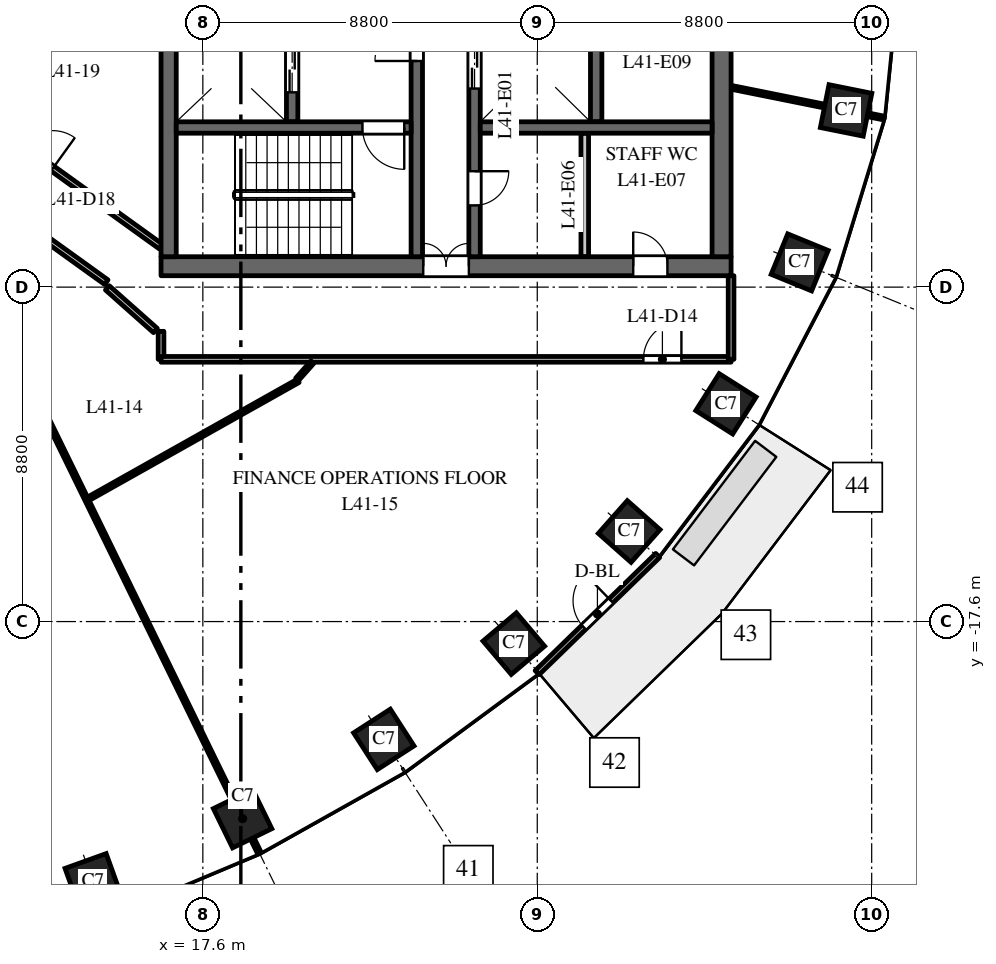
"""IFC4 building model, lengths in metres.
Left out: names, types, materials, properties, quantities, classifications, styles, units other than length and angle.
Written with IfcOpenShell. Run it as: python <this file> out.ifc"""

import sys

from ifc_helpers import new_model, si_unit, direction, frame, frame_2d, origin, origin_2d, place, context, subcontext, project, spatial, rectangle, extrude, element, fill, save


model = new_model("IFC4")
c1 = context("Model", 3, precision=1e-05, world=origin(), true_north=direction((0.0, 1.0)))
c2 = subcontext(c1, "Body", "Model", "MODEL_VIEW")
j1 = project(units=[si_unit("LENGTHUNIT", "METRE"), si_unit("PLANEANGLEUNIT", "RADIAN")], contexts=[c1])
p1 = place(None, origin())
s1 = spatial("IfcSite", under=j1, at=p1, CompositionType="ELEMENT")
p2 = place(p1, origin())
s2 = spatial("IfcBuilding", under=s1, at=p2, CompositionType="ELEMENT")
p3 = place(p2, frame((0.0, 0.0, 178.0)))
s3 = spatial("IfcBuildingStorey", under=s2, at=p3, CompositionType="ELEMENT", Elevation=178.0)
for number, where, z_axis, x_axis in (
    (1, (14.709, -24.441, 0.0), (0.0, 0.0, 1.0), (0.941, 0.338, 0.0)),
    (2, (18.646, -22.785, 0.0), (0.0, 0.0, 1.0), (0.898, 0.439, 0.0)),
    (3, (22.362, -20.7, 0.0), (0.0, 0.0, 1.0), (0.84, 0.542, 0.0)),
    (4, (25.783, -18.18, 0.0), (0.0, 0.0, 1.0), (0.763, 0.646, 0.0)),
    (5, (28.819, -15.23, 0.0), (0.0, 0.0, 1.0), (0.663, 0.749, 0.0)),
    (6, (31.365, -11.871, 0.0), (0.0, 0.0, 1.0), (0.535, 0.845, 0.0)),
    (7, (33.305, -8.149, 0.0), (0.0, 0.0, 1.0), (0.379, 0.925, 0.0)),
    (8, (34.527, -4.151, 0.0), (0.0, 0.0, 1.0), (0.197, 0.98, 0.0)),
):
    element("IfcColumn", number, at=place(p3, frame(where, z_axis=z_axis, x_axis=x_axis)), inside=s3, PredefinedType="COLUMN", context=c2, shape_type="SweptSolid", body=[
        extrude(rectangle(XDim=1.15, YDim=1.15, at=origin_2d()), origin(), (0.0, 0.0, 1.0), 4.0),
    ])
p4 = place(p3, frame((16.5, -8.25, 0.0), z_axis=(0.0, 0.0, 1.0), x_axis=(1.0, 0.0, 0.0)))
e9 = element("IfcWall", 9, at=p4, inside=s3, PredefinedType="SHEAR", context=c2, shape_type="SweptSolid", body=[
    extrude(rectangle(XDim=15.0, YDim=0.5, at=frame_2d((7.5, 0.0))), origin(), (0.0, 0.0, 1.0), 3.7),
])
p5 = place(p4, frame((6.9, 0.0, 0.0)))
e10 = element("IfcOpeningElement", 10, at=p5, cuts=e9, PredefinedType="OPENING", context=c2, shape_type="SweptSolid", body=[
    extrude(rectangle(XDim=1.2, YDim=2.1, at=frame_2d((0.6, 1.05))), frame((0.0, 0.26, 0.0), z_axis=(0.0, -1.0, 0.0), x_axis=(1.0, 0.0, 0.0)), (0.0, 0.0, 1.0), 0.52),
])
p6 = place(p4, frame((12.425, 0.0, 0.0)))
e11 = element("IfcOpeningElement", 11, at=p6, cuts=e9, PredefinedType="OPENING", context=c2, shape_type="SweptSolid", body=[
    extrude(rectangle(XDim=0.9, YDim=2.1, at=frame_2d((0.45, 1.05))), frame((0.0, 0.26, 0.0), z_axis=(0.0, -1.0, 0.0), x_axis=(1.0, 0.0, 0.0)), (0.0, 0.0, 1.0), 0.52),
])
p7 = place(p3, frame((27.95, -4.45, 0.0), z_axis=(0.0, 0.0, 1.0), x_axis=(0.0, 1.0, 0.0)))
e12 = element("IfcWall", 12, at=p7, inside=s3, PredefinedType="SHEAR", context=c2, shape_type="SweptSolid", body=[
    extrude(rectangle(XDim=8.9, YDim=0.3, at=frame_2d((4.45, 0.0))), origin(), (0.0, 0.0, 1.0), 3.7),
])
p8 = place(p3, frame((19.95, -4.45, 0.0), z_axis=(0.0, 0.0, 1.0), x_axis=(0.0, 1.0, 0.0)))
e13 = element("IfcWall", 13, at=p8, inside=s3, PredefinedType="SHEAR", context=c2, shape_type="SweptSolid", body=[
    extrude(rectangle(XDim=8.9, YDim=0.3, at=frame_2d((4.45, 0.0))), origin(), (0.0, 0.0, 1.0), 3.7),
])
p9 = place(p8, frame((0.775, 0.0, 0.0)))
e14 = element("IfcOpeningElement", 14, at=p9, cuts=e13, PredefinedType="OPENING", context=c2, shape_type="SweptSolid", body=[
    extrude(rectangle(XDim=1.2, YDim=2.1, at=frame_2d((0.6, 1.05))), frame((0.0, 0.16, 0.0), z_axis=(0.0, -1.0, 0.0), x_axis=(1.0, 0.0, 0.0)), (0.0, 0.0, 1.0), 0.32),
])
p10 = place(p8, frame((4.675, 0.0, 0.0)))
e15 = element("IfcOpeningElement", 15, at=p10, cuts=e13, PredefinedType="OPENING", context=c2, shape_type="SweptSolid", body=[
    extrude(rectangle(XDim=1.1, YDim=2.1, at=frame_2d((0.55, 1.05))), frame((0.0, 0.16, 0.0), z_axis=(0.0, -1.0, 0.0), x_axis=(1.0, 0.0, 0.0)), (0.0, 0.0, 1.0), 0.32),
])
p11 = place(p8, frame((7.25, 0.0, 0.0)))
e16 = element("IfcOpeningElement", 16, at=p11, cuts=e13, PredefinedType="OPENING", context=c2, shape_type="SweptSolid", body=[
    extrude(rectangle(XDim=1.1, YDim=2.1, at=frame_2d((0.55, 1.05))), frame((0.0, 0.16, 0.0), z_axis=(0.0, -1.0, 0.0), x_axis=(1.0, 0.0, 0.0)), (0.0, 0.0, 1.0), 0.32),
])
p12 = place(p3, frame((24.75, -8.0, 0.0), z_axis=(0.0, 0.0, 1.0), x_axis=(0.0, 1.0, 0.0)))
e17 = element("IfcWall", 17, at=p12, inside=s3, PredefinedType="SHEAR", context=c2, shape_type="SweptSolid", body=[
    extrude(rectangle(XDim=16.0, YDim=0.3, at=frame_2d((8.0, 0.0))), origin(), (0.0, 0.0, 1.0), 3.7),
])
p13 = place(p12, frame((4.425, 0.0, 0.0)))
e18 = element("IfcOpeningElement", 18, at=p13, cuts=e17, PredefinedType="OPENING", context=c2, shape_type="SweptSolid", body=[
    extrude(rectangle(XDim=1.1, YDim=2.1, at=frame_2d((0.55, 1.05))), frame((0.0, 0.16, 0.0), z_axis=(0.0, -1.0, 0.0), x_axis=(1.0, 0.0, 0.0)), (0.0, 0.0, 1.0), 0.32),
])
p14 = place(p12, frame((7.45, 0.0, 0.0)))
e19 = element("IfcOpeningElement", 19, at=p14, cuts=e17, PredefinedType="OPENING", context=c2, shape_type="SweptSolid", body=[
    extrude(rectangle(XDim=1.1, YDim=2.1, at=frame_2d((0.55, 1.05))), frame((0.0, 0.16, 0.0), z_axis=(0.0, -1.0, 0.0), x_axis=(1.0, 0.0, 0.0)), (0.0, 0.0, 1.0), 0.32),
])
p15 = place(p12, frame((10.475, 0.0, 0.0)))
e20 = element("IfcOpeningElement", 20, at=p15, cuts=e17, PredefinedType="OPENING", context=c2, shape_type="SweptSolid", body=[
    extrude(rectangle(XDim=1.1, YDim=2.1, at=frame_2d((0.55, 1.05))), frame((0.0, 0.16, 0.0), z_axis=(0.0, -1.0, 0.0), x_axis=(1.0, 0.0, 0.0)), (0.0, 0.0, 1.0), 0.32),
])
p16 = place(p12, frame((13.75, 0.0, 0.0)))
e21 = element("IfcOpeningElement", 21, at=p16, cuts=e17, PredefinedType="OPENING", context=c2, shape_type="SweptSolid", body=[
    extrude(rectangle(XDim=0.9, YDim=2.1, at=frame_2d((0.45, 1.05))), frame((0.0, 0.16, 0.0), z_axis=(0.0, -1.0, 0.0), x_axis=(1.0, 0.0, 0.0)), (0.0, 0.0, 1.0), 0.32),
])
p17 = place(p12, frame((1.35, 0.0, 0.0)))
e22 = element("IfcOpeningElement", 22, at=p17, cuts=e17, PredefinedType="OPENING", context=c2, shape_type="SweptSolid", body=[
    extrude(rectangle(XDim=0.9, YDim=2.1, at=frame_2d((0.45, 1.05))), frame((0.0, 0.16, 0.0), z_axis=(0.0, -1.0, 0.0), x_axis=(1.0, 0.0, 0.0)), (0.0, 0.0, 1.0), 0.32),
])
p18 = place(p3, frame((16.7, -8.0, 0.0), z_axis=(0.0, 0.0, 1.0), x_axis=(0.0, 1.0, 0.0)))
e23 = element("IfcWall", 23, at=p18, inside=s3, PredefinedType="SHEAR", context=c2, shape_type="SweptSolid", body=[
    extrude(rectangle(XDim=16.0, YDim=0.4, at=frame_2d((8.0, 0.0))), origin(), (0.0, 0.0, 1.0), 3.7),
])
p19 = place(p3, frame((31.25, -8.0, 0.0), z_axis=(0.0, 0.0, 1.0), x_axis=(0.0, 1.0, 0.0)))
e24 = element("IfcWall", 24, at=p19, inside=s3, PredefinedType="SHEAR", context=c2, shape_type="SweptSolid", body=[
    extrude(rectangle(XDim=16.0, YDim=0.5, at=frame_2d((8.0, 0.0))), origin(), (0.0, 0.0, 1.0), 3.7),
])
p20 = place(p3, frame((27.65, -8.0, 0.0), z_axis=(0.0, 0.0, 1.0), x_axis=(0.0, 1.0, 0.0)))
e25 = element("IfcWall", 25, at=p20, inside=s3, PredefinedType="PARTITIONING", context=c2, shape_type="SweptSolid", body=[
    extrude(rectangle(XDim=3.25, YDim=0.2, at=frame_2d((1.625, 0.0))), origin(), (0.0, 0.0, 1.0), 3.7),
])
p21 = place(p3, frame((24.9, -4.6, 0.0), z_axis=(0.0, 0.0, 1.0), x_axis=(1.0, 0.0, 0.0)))
e26 = element("IfcWall", 26, at=p21, inside=s3, PredefinedType="SHEAR", context=c2, shape_type="SweptSolid", body=[
    extrude(rectangle(XDim=6.1, YDim=0.3, at=frame_2d((3.05, 0.0))), origin(), (0.0, 0.0, 1.0), 3.7),
])
p22 = place(p3, frame((23.23, -8.0, 0.0), z_axis=(0.0, 0.0, 1.0), x_axis=(0.0, 1.0, 0.0)))
e27 = element("IfcWall", 27, at=p22, inside=s3, PredefinedType="SHEAR", context=c2, shape_type="SweptSolid", body=[
    extrude(rectangle(XDim=7.875, YDim=0.3, at=frame_2d((3.938, 0.0))), origin(), (0.0, 0.0, 1.0), 3.7),
])
p23 = place(p22, frame((5.15, 0.0, 0.0)))
e28 = element("IfcOpeningElement", 28, at=p23, cuts=e27, PredefinedType="OPENING", context=c2, shape_type="SweptSolid", body=[
    extrude(rectangle(XDim=1.1, YDim=2.1, at=frame_2d((0.55, 1.05))), frame((0.0, 0.16, 0.0), z_axis=(0.0, -1.0, 0.0), x_axis=(1.0, 0.0, 0.0)), (0.0, 0.0, 1.0), 0.32),
])
p24 = place(p3, frame((16.9, -4.6, 0.0), z_axis=(0.0, 0.0, 1.0), x_axis=(1.0, 0.0, 0.0)))
e29 = element("IfcWall", 29, at=p24, inside=s3, PredefinedType="SHEAR", context=c2, shape_type="SweptSolid", body=[
    extrude(rectangle(XDim=6.18, YDim=0.3, at=frame_2d((3.09, 0.0))), origin(), (0.0, 0.0, 1.0), 3.7),
])
p25 = place(p24, frame((4.9, 0.0, 0.0)))
e30 = element("IfcOpeningElement", 30, at=p25, cuts=e29, PredefinedType="OPENING", context=c2, shape_type="SweptSolid", body=[
    extrude(rectangle(XDim=1.1, YDim=2.1, at=frame_2d((0.55, 1.05))), frame((0.0, 0.16, 0.0), z_axis=(0.0, -1.0, 0.0), x_axis=(1.0, 0.0, 0.0)), (0.0, 0.0, 1.0), 0.32),
])
p26 = place(p3, frame((26.396, -18.943, 0.0), z_axis=(0.0, 0.0, 1.0), x_axis=(0.717214761864, 0.696852197647, 0.0)))
e31 = element("IfcWall", 31, at=p26, inside=s3, PredefinedType="STANDARD", context=c2, shape_type="SweptSolid", body=[
    extrude(rectangle(XDim=4.424, YDim=0.15, at=frame_2d((2.212, 0.0))), origin(), (0.0, 0.0, 1.0), 3.7),
])
p27 = place(p26, frame((1.712, 0.0, 0.0)))
e32 = element("IfcOpeningElement", 32, at=p27, cuts=e31, PredefinedType="OPENING", context=c2, shape_type="SweptSolid", body=[
    extrude(rectangle(XDim=1.0, YDim=2.4, at=frame_2d((0.5, 1.2))), frame((0.0, 0.085, 0.0), z_axis=(0.0, -1.0, 0.0), x_axis=(1.0, 0.0, 0.0)), (0.0, 0.0, 1.0), 0.17),
])
p28 = place(p3, frame((10.439, -5.345, 0.0), z_axis=(0.0, 0.0, 1.0), x_axis=(0.811697765448, -0.584077681106, 0.0)))
e33 = element("IfcWall", 33, at=p28, inside=s3, PredefinedType="PARTITIONING", context=c2, shape_type="SweptSolid", body=[
    extrude(rectangle(XDim=5.694, YDim=0.15, at=frame_2d((2.847, 0.0))), origin(), (0.0, 0.0, 1.0), 2.75),
])
p29 = place(p28, frame((0.65, 0.0, 0.0)))
e34 = element("IfcOpeningElement", 34, at=p29, cuts=e33, PredefinedType="OPENING", context=c2, shape_type="SweptSolid", body=[
    extrude(rectangle(XDim=1.0, YDim=2.1, at=frame_2d((0.5, 1.05))), frame((0.0, 0.085, 0.0), z_axis=(0.0, -1.0, 0.0), x_axis=(1.0, 0.0, 0.0)), (0.0, 0.0, 1.0), 0.17),
])
p30 = place(p3, frame((11.291, -3.986, 0.0), z_axis=(0.0, 0.0, 1.0), x_axis=(0.81164111506, -0.584156400584, 0.0)))
e35 = element("IfcWall", 35, at=p30, inside=s3, PredefinedType="PARTITIONING", context=c2, shape_type="SweptSolid", body=[
    extrude(rectangle(XDim=6.418, YDim=0.15, at=frame_2d((3.209, 0.0))), origin(), (0.0, 0.0, 1.0), 3.7),
])
p31 = place(p30, frame((1.903, 0.0, 0.0)))
e36 = element("IfcOpeningElement", 36, at=p31, cuts=e35, PredefinedType="OPENING", context=c2, shape_type="SweptSolid", body=[
    extrude(rectangle(XDim=1.0, YDim=2.1, at=frame_2d((0.5, 1.05))), frame((0.0, 0.085, 0.0), z_axis=(0.0, -1.0, 0.0), x_axis=(1.0, 0.0, 0.0)), (0.0, 0.0, 1.0), 0.17),
])
p32 = place(p3, frame((12.769, -10.765, 0.0), z_axis=(0.0, 0.0, 1.0), x_axis=(0.439149239372, -0.898414128094, 0.0)))
e37 = element("IfcWall", 37, at=p32, inside=s3, PredefinedType="PARTITIONING", context=c2, shape_type="SweptSolid", body=[
    extrude(rectangle(XDim=14.382, YDim=0.1, at=frame_2d((7.191, 0.0))), origin(), (0.0, 0.0, 1.0), 2.9),
])
p33 = place(p3, frame((14.588, -14.369, 0.0), z_axis=(0.0, 0.0, 1.0), x_axis=(0.871762845587, 0.489928097841, 0.0)))
e38 = element("IfcWall", 38, at=p33, inside=s3, PredefinedType="PARTITIONING", context=c2, shape_type="SweptSolid", body=[
    extrude(rectangle(XDim=6.333, YDim=0.1, at=frame_2d((3.167, 0.0))), origin(), (0.0, 0.0, 1.0), 3.7),
])
p34 = place(p3, frame((16.5, -10.7, 0.0), z_axis=(0.0, 0.0, 1.0), x_axis=(0.0, 1.0, 0.0)))
e39 = element("IfcWall", 39, at=p34, inside=s3, PredefinedType="PARTITIONING", context=c2, shape_type="SweptSolid", body=[
    extrude(rectangle(XDim=0.736, YDim=0.15, at=frame_2d((0.368, 0.0))), origin(), (0.0, 0.0, 1.0), 3.7),
])
p35 = place(p3, frame((16.5, -10.7, 0.0), z_axis=(0.0, 0.0, 1.0), x_axis=(1.0, 0.0, 0.0)))
e40 = element("IfcWall", 40, at=p35, inside=s3, PredefinedType="PARTITIONING", context=c2, shape_type="SweptSolid", body=[
    extrude(rectangle(XDim=15.0, YDim=0.15, at=frame_2d((7.5, 0.0))), origin(), (0.0, 0.0, 1.0), 2.75),
])
p36 = place(p35, frame((12.693, 0.0, 0.0)))
e41 = element("IfcOpeningElement", 41, at=p36, cuts=e40, PredefinedType="OPENING", context=c2, shape_type="SweptSolid", body=[
    extrude(rectangle(XDim=1.0, YDim=2.1, at=frame_2d((0.5, 1.05))), frame((0.0, 0.085, 0.0), z_axis=(0.0, -1.0, 0.0), x_axis=(1.0, 0.0, 0.0)), (0.0, 0.0, 1.0), 0.17),
])
p37 = place(p3, frame((20.079, -11.229, 0.0), z_axis=(0.0, 0.0, 1.0), x_axis=(0.663614598559, 0.748074638375, 0.0)))
e42 = element("IfcWall", 42, at=p37, inside=s3, PredefinedType="PARTITIONING", context=c2, shape_type="SweptSolid", body=[
    extrude(rectangle(XDim=0.607, YDim=0.1, at=frame_2d((0.303, 0.0))), origin(), (0.0, 0.0, 1.0), 2.75),
])
p38 = place(p3, frame((31.5, -10.7, 0.0), z_axis=(0.0, 0.0, 1.0), x_axis=(0.0, 1.0, 0.0)))
e43 = element("IfcWall", 43, at=p38, inside=s3, PredefinedType="PARTITIONING", context=c2, shape_type="SweptSolid", body=[
    extrude(rectangle(XDim=2.2, YDim=0.15, at=frame_2d((1.1, 0.0))), origin(), (0.0, 0.0, 1.0), 2.9),
])
p39 = place(p3, frame((31.5, -3.542, 0.0), z_axis=(0.0, 0.0, 1.0), x_axis=(0.980357474535, -0.197228857227, 0.0)))
e44 = element("IfcWall", 44, at=p39, inside=s3, PredefinedType="PARTITIONING", context=c2, shape_type="SweptSolid", body=[
    extrude(rectangle(XDim=4.092, YDim=0.1, at=frame_2d((2.046, 0.0))), origin(), (0.0, 0.0, 1.0), 2.9),
])
p40 = place(p3, frame((16.352, -9.942, 0.0), z_axis=(0.0, 0.0, 1.0), x_axis=(-0.747926695066, 0.663781333579, 0.0)))
e45 = element("IfcWall", 45, at=p40, inside=s3, PredefinedType="PARTITIONING", context=c2, shape_type="SweptSolid", body=[
    extrude(rectangle(XDim=1.691, YDim=0.15, at=frame_2d((0.846, 0.0))), origin(), (0.0, 0.0, 1.0), 3.7),
])
p41 = place(p9, origin())
e46 = element("IfcDoor", 46, at=p41, inside=s3, OperationType="DOUBLE_DOOR_SLIDING", PredefinedType="DOOR", context=c2, shape_type="SweptSolid", body=[
    extrude(rectangle(XDim=1.2, YDim=2.1, at=frame_2d((0.6, 1.05))), frame((0.0, 0.025, 0.0), z_axis=(0.0, -1.0, 0.0), x_axis=(1.0, 0.0, 0.0)), (0.0, 0.0, 1.0), 0.05),
])
fill(e14, e46)
p42 = place(p13, origin())
e47 = element("IfcDoor", 47, at=p42, inside=s3, OperationType="DOUBLE_DOOR_SLIDING", PredefinedType="DOOR", context=c2, shape_type="SweptSolid", body=[
    extrude(rectangle(XDim=1.1, YDim=2.1, at=frame_2d((0.55, 1.05))), frame((0.0, 0.025, 0.0), z_axis=(0.0, -1.0, 0.0), x_axis=(1.0, 0.0, 0.0)), (0.0, 0.0, 1.0), 0.05),
])
fill(e18, e47)
p43 = place(p25, origin())
e48 = element("IfcDoor", 48, at=p43, inside=s3, OperationType="SINGLE_SWING_RIGHT", PredefinedType="DOOR", context=c2, shape_type="SweptSolid", body=[
    extrude(rectangle(XDim=1.1, YDim=2.1, at=frame_2d((0.55, 1.05))), frame((0.0, 0.025, 0.0), z_axis=(0.0, -1.0, 0.0), x_axis=(1.0, 0.0, 0.0)), (0.0, 0.0, 1.0), 0.05),
])
fill(e30, e48)
p44 = place(p23, origin())
e49 = element("IfcDoor", 49, at=p44, inside=s3, OperationType="SINGLE_SWING_RIGHT", PredefinedType="DOOR", context=c2, shape_type="SweptSolid", body=[
    extrude(rectangle(XDim=1.1, YDim=2.1, at=frame_2d((0.55, 1.05))), frame((0.0, 0.025, 0.0), z_axis=(0.0, -1.0, 0.0), x_axis=(1.0, 0.0, 0.0)), (0.0, 0.0, 1.0), 0.05),
])
fill(e28, e49)
p45 = place(p5, origin())
e50 = element("IfcDoor", 50, at=p45, inside=s3, OperationType="DOUBLE_DOOR_DOUBLE_SWING", PredefinedType="DOOR", context=c2, shape_type="SweptSolid", body=[
    extrude(rectangle(XDim=1.2, YDim=2.1, at=frame_2d((0.6, 1.05))), frame((0.0, 0.025, 0.0), z_axis=(0.0, -1.0, 0.0), x_axis=(1.0, 0.0, 0.0)), (0.0, 0.0, 1.0), 0.05),
])
fill(e10, e50)
p46 = place(p17, origin())
e51 = element("IfcDoor", 51, at=p46, inside=s3, OperationType="SINGLE_SWING_RIGHT", PredefinedType="DOOR", context=c2, shape_type="SweptSolid", body=[
    extrude(rectangle(XDim=0.9, YDim=2.1, at=frame_2d((0.45, 1.05))), frame((0.0, 0.025, 0.0), z_axis=(0.0, -1.0, 0.0), x_axis=(1.0, 0.0, 0.0)), (0.0, 0.0, 1.0), 0.05),
])
fill(e22, e51)
p47 = place(p6, origin())
e52 = element("IfcDoor", 52, at=p47, inside=s3, OperationType="SINGLE_SWING_RIGHT", PredefinedType="DOOR", context=c2, shape_type="SweptSolid", body=[
    extrude(rectangle(XDim=0.9, YDim=2.1, at=frame_2d((0.45, 1.05))), frame((0.0, 0.025, 0.0), z_axis=(0.0, -1.0, 0.0), x_axis=(1.0, 0.0, 0.0)), (0.0, 0.0, 1.0), 0.05),
])
fill(e11, e52)
p48 = place(p27, origin())
e53 = element("IfcDoor", 53, at=p48, inside=s3, OperationType="SINGLE_SWING_RIGHT", PredefinedType="DOOR", context=c2, shape_type="SweptSolid", body=[
    extrude(rectangle(XDim=1.0, YDim=2.4, at=frame_2d((0.5, 1.2))), frame((0.0, 0.025, 0.0), z_axis=(0.0, -1.0, 0.0), x_axis=(1.0, 0.0, 0.0)), (0.0, 0.0, 1.0), 0.05),
])
fill(e32, e53)
p49 = place(p36, origin())
e54 = element("IfcDoor", 54, at=p49, inside=s3, OperationType="SINGLE_SWING_RIGHT", PredefinedType="DOOR", context=c2, shape_type="SweptSolid", body=[
    extrude(rectangle(XDim=1.0, YDim=2.1, at=frame_2d((0.5, 1.05))), frame((0.0, 0.025, 0.0), z_axis=(0.0, -1.0, 0.0), x_axis=(1.0, 0.0, 0.0)), (0.0, 0.0, 1.0), 0.05),
])
fill(e41, e54)
p50 = place(p31, origin())
e55 = element("IfcDoor", 55, at=p50, inside=s3, OperationType="SINGLE_SWING_RIGHT", PredefinedType="DOOR", context=c2, shape_type="SweptSolid", body=[
    extrude(rectangle(XDim=1.0, YDim=2.1, at=frame_2d((0.5, 1.05))), frame((0.0, 0.025, 0.0), z_axis=(0.0, -1.0, 0.0), x_axis=(1.0, 0.0, 0.0)), (0.0, 0.0, 1.0), 0.05),
])
fill(e36, e55)
save(model, sys.argv[1])
